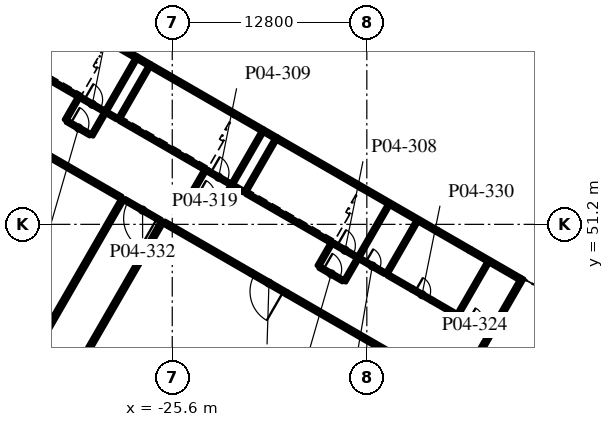
"""IFC4 building model, lengths in metres.
Left out: names, types, materials, properties, quantities, classifications, styles, units other than length and angle.
Written with IfcOpenShell. Run it as: python <this file> out.ifc"""

import sys

from ifc_helpers import new_model, si_unit, direction, frame, frame_2d, origin, place, context, subcontext, project, spatial, rectangle, extrude, element, fill, save


model = new_model("IFC4")
c1 = context("Model", 3, precision=1e-05, world=origin(), true_north=direction((0.0, 1.0)))
c2 = subcontext(c1, "Body", "Model", "MODEL_VIEW")
j1 = project(units=[si_unit("LENGTHUNIT", "METRE"), si_unit("PLANEANGLEUNIT", "RADIAN")], contexts=[c1])
p1 = place(None, origin())
s1 = spatial("IfcSite", under=j1, at=p1, CompositionType="ELEMENT")
p2 = place(p1, origin())
s2 = spatial("IfcBuilding", under=s1, at=p2, CompositionType="ELEMENT")
p3 = place(p2, frame((0.0, 0.0, 21.6)))
s3 = spatial("IfcBuildingStorey", under=s2, at=p3, CompositionType="ELEMENT", Elevation=21.6)
p4 = place(p3, frame((-2.562, 47.667, 0.0), z_axis=(0.0, 0.0, 1.0), x_axis=(-0.499999331568, -0.866025789703, 0.0)))
e1 = element("IfcWall", 1, at=p4, inside=s3, PredefinedType="SOLIDWALL", context=c2, shape_type="SweptSolid", body=[
    extrude(rectangle(XDim=8.625, YDim=0.25, at=frame_2d((4.312, 0.0))), origin(), (0.0, 0.0, 1.0), 4.5),
])
for number, where, z_axis, x_axis in (
    (2, (-26.252, 51.385, 0.0), (0.0, 0.0, 1.0), (-0.5, -0.866, 0.0)),
    (3, (-38.538, 36.106, 0.0), (0.0, 0.0, 1.0), (0.5, 0.866, 0.0)),
):
    element("IfcWall", number, at=place(p3, frame(where, z_axis=z_axis, x_axis=x_axis)), inside=s3, PredefinedType="SOLIDWALL", context=c2, shape_type="SweptSolid", body=[
        extrude(rectangle(XDim=19.375, YDim=0.25, at=frame_2d((9.688, 0.0))), origin(), (0.0, 0.0, 1.0), 4.5),
    ])
p5 = place(p3, frame((-6.024, 49.522, 0.0), z_axis=(0.0, 0.0, 1.0), x_axis=(0.866000483506, -0.500043160704, 0.0)))
e4 = element("IfcWall", 4, at=p5, inside=s3, PredefinedType="SOLIDWALL", context=c2, shape_type="SweptSolid", body=[
    extrude(rectangle(XDim=3.8, YDim=0.25, at=frame_2d((1.9, 0.0))), origin(), (0.0, 0.0, 1.0), 4.5),
])
p6 = place(p3, frame((-8.189, 50.772, 0.0), z_axis=(0.0, 0.0, 1.0), x_axis=(0.866022959057, -0.500004234368, 0.0)))
e5 = element("IfcWall", 5, at=p6, inside=s3, PredefinedType="SOLIDWALL", context=c2, shape_type="SweptSolid", body=[
    extrude(rectangle(XDim=2.5, YDim=0.25, at=frame_2d((1.25, 0.0))), origin(), (0.0, 0.0, 1.0), 4.5),
])
p7 = place(p6, frame((0.25, 0.0, 0.9)))
e6 = element("IfcOpeningElement", 6, at=p7, cuts=e5, PredefinedType="OPENING", context=c2, shape_type="SweptSolid", body=[
    extrude(rectangle(XDim=2.0, YDim=1.8, at=frame_2d((1.0, 0.9))), frame((0.0, 0.135, 0.0), z_axis=(0.0, -1.0, 0.0), x_axis=(1.0, 0.0, 0.0)), (0.0, 0.0, 1.0), 0.27),
])
p8 = place(p3, frame((-18.755, 56.872, 0.0), z_axis=(0.0, 0.0, 1.0), x_axis=(0.866033961403, -0.499985177477, 0.0)))
e7 = element("IfcWall", 7, at=p8, inside=s3, PredefinedType="SOLIDWALL", context=c2, shape_type="SweptSolid", body=[
    extrude(rectangle(XDim=12.2, YDim=0.25, at=frame_2d((6.1, 0.0))), origin(), (0.0, 0.0, 1.0), 4.5),
])
p9 = place(p3, frame((-27.069, 61.672, 0.0), z_axis=(0.0, 0.0, 1.0), x_axis=(0.866021068297, -0.500007509209, 0.0)))
e8 = element("IfcWall", 8, at=p9, inside=s3, PredefinedType="SOLIDWALL", context=c2, shape_type="SweptSolid", body=[
    extrude(rectangle(XDim=8.6, YDim=0.25, at=frame_2d((4.3, 0.0))), origin(), (0.0, 0.0, 1.0), 4.5),
])
p10 = place(p3, frame((-35.383, 66.472, 0.0), z_axis=(0.0, 0.0, 1.0), x_axis=(0.866028165386, -0.499995216735, 0.0)))
e9 = element("IfcWall", 9, at=p10, inside=s3, PredefinedType="SOLIDWALL", context=c2, shape_type="SweptSolid", body=[
    extrude(rectangle(XDim=8.6, YDim=0.25, at=frame_2d((4.3, 0.0))), origin(), (0.0, 0.0, 1.0), 4.5),
])
p11 = place(p3, frame((-18.068, 46.66, 0.0), z_axis=(0.0, 0.0, 1.0), x_axis=(0.866025499775, -0.499999833739, 0.0)))
e10 = element("IfcWall", 10, at=p11, inside=s3, PredefinedType="SOLIDWALL", context=c2, shape_type="SweptSolid", body=[
    extrude(rectangle(XDim=12.8, YDim=0.25, at=frame_2d((6.4, 0.0))), origin(), (0.0, 0.0, 1.0), 4.5),
])
p12 = place(p3, frame((-18.068, 46.66, 0.0), z_axis=(0.0, 0.0, 1.0), x_axis=(-0.866019956843, 0.50000943426, 0.0)))
e11 = element("IfcWall", 11, at=p12, inside=s3, PredefinedType="SOLIDWALL", context=c2, shape_type="SweptSolid", body=[
    extrude(rectangle(XDim=2.7, YDim=0.25, at=frame_2d((1.35, 0.0))), origin(), (0.0, 0.0, 1.0), 4.5),
])
p13 = place(p12, frame((0.25, 0.0, 0.0)))
e12 = element("IfcOpeningElement", 12, at=p13, cuts=e11, PredefinedType="OPENING", context=c2, shape_type="SweptSolid", body=[
    extrude(rectangle(XDim=2.2, YDim=2.1, at=frame_2d((1.1, 1.05))), frame((0.0, 0.135, 0.0), z_axis=(0.0, -1.0, 0.0), x_axis=(1.0, 0.0, 0.0)), (0.0, 0.0, 1.0), 0.27),
])
for number, where, z_axis, x_axis in (
    (13, (-26.144, 51.323, 0.0), (0.0, 0.0, 1.0), (0.866, -0.5, 0.0)),
    (14, (-34.696, 56.26, 0.0), (0.0, 0.0, 1.0), (0.866, -0.5, 0.0)),
):
    element("IfcWall", number, at=place(p3, frame(where, z_axis=z_axis, x_axis=x_axis)), inside=s3, PredefinedType="SOLIDWALL", context=c2, shape_type="SweptSolid", body=[
        extrude(rectangle(XDim=6.625, YDim=0.25, at=frame_2d((3.312, 0.0))), origin(), (0.0, 0.0, 1.0), 4.5),
    ])
for number, where, z_axis, x_axis in (
    (15, (-19.621, 57.372, 0.0), (0.0, 0.0, 1.0), (0.866, -0.5, 0.0)),
    (16, (-27.935, 62.172, 0.0), (0.0, 0.0, 1.0), (0.866, -0.5, 0.0)),
):
    element("IfcWall", number, at=place(p3, frame(where, z_axis=z_axis, x_axis=x_axis)), inside=s3, PredefinedType="SOLIDWALL", context=c2, shape_type="SweptSolid", body=[
        extrude(rectangle(XDim=1.0, YDim=0.25, at=frame_2d((0.5, 0.0))), origin(), (0.0, 0.0, 1.0), 4.5),
    ])
p14 = place(p3, frame((-11.369, 52.463, 0.0), z_axis=(0.0, 0.0, 1.0), x_axis=(-0.50002537861, -0.866010750942, 0.0)))
e17 = element("IfcWall", 17, at=p14, inside=s3, PredefinedType="SOLIDWALL", context=c2, shape_type="SweptSolid", body=[
    extrude(rectangle(XDim=4.0, YDim=0.2, at=frame_2d((2.0, 0.0))), origin(), (0.0, 0.0, 1.0), 4.5),
])
for number, where, z_axis, x_axis in (
    (18, (-18.817, 56.763, 0.0), (0.0, 0.0, 1.0), (-0.5, -0.866, 0.0)),
    (19, (-19.683, 57.263, 0.0), (0.0, 0.0, 1.0), (-0.5, -0.866, 0.0)),
    (20, (-27.131, 61.563, 0.0), (0.0, 0.0, 1.0), (-0.5, -0.866, 0.0)),
    (21, (-27.997, 62.063, 0.0), (0.0, 0.0, 1.0), (-0.5, -0.866, 0.0)),
):
    element("IfcWall", number, at=place(p3, frame(where, z_axis=z_axis, x_axis=x_axis)), inside=s3, PredefinedType="SOLIDWALL", context=c2, shape_type="SweptSolid", body=[
        extrude(rectangle(XDim=4.0, YDim=0.2, at=frame_2d((2.0, 0.0))), origin(), (0.0, 0.0, 1.0), 4.5),
    ])
p15 = place(p3, frame((-14.972, 49.924, 0.0), z_axis=(0.0, 0.0, 1.0), x_axis=(0.866036909293, -0.499980071345, 0.0)))
e22 = element("IfcWall", 22, at=p15, inside=s3, PredefinedType="SOLIDWALL", context=c2, shape_type="SweptSolid", body=[
    extrude(rectangle(XDim=1.75, YDim=0.2, at=frame_2d((0.875, 0.0))), origin(), (0.0, 0.0, 1.0), 4.5),
])
p16 = place(p15, frame((0.25, 0.0, 0.0)))
e23 = element("IfcOpeningElement", 23, at=p16, cuts=e22, PredefinedType="OPENING", context=c2, shape_type="SweptSolid", body=[
    extrude(rectangle(XDim=1.2, YDim=2.1, at=frame_2d((0.6, 1.05))), frame((0.0, 0.11, 0.0), z_axis=(0.0, -1.0, 0.0), x_axis=(1.0, 0.0, 0.0)), (0.0, 0.0, 1.0), 0.22),
])
p17 = place(p3, frame((-14.972, 49.924, 0.0), z_axis=(0.0, 0.0, 1.0), x_axis=(-0.86601134256, 0.500024353964, 0.0)))
e24 = element("IfcWall", 24, at=p17, inside=s3, PredefinedType="SOLIDWALL", context=c2, shape_type="SweptSolid", body=[
    extrude(rectangle(XDim=6.65, YDim=0.2, at=frame_2d((3.325, 0.0))), origin(), (0.0, 0.0, 1.0), 4.5),
])
p18 = place(p3, frame((-23.285, 54.724, 0.0), z_axis=(0.0, 0.0, 1.0), x_axis=(0.866002029911, -0.500040482552, 0.0)))
e25 = element("IfcWall", 25, at=p18, inside=s3, PredefinedType="SOLIDWALL", context=c2, shape_type="SweptSolid", body=[
    extrude(rectangle(XDim=1.75, YDim=0.2, at=frame_2d((0.875, 0.0))), origin(), (0.0, 0.0, 1.0), 4.5),
])
p19 = place(p18, frame((0.25, 0.0, 0.0)))
e26 = element("IfcOpeningElement", 26, at=p19, cuts=e25, PredefinedType="OPENING", context=c2, shape_type="SweptSolid", body=[
    extrude(rectangle(XDim=1.2, YDim=2.1, at=frame_2d((0.6, 1.05))), frame((0.0, 0.11, 0.0), z_axis=(0.0, -1.0, 0.0), x_axis=(1.0, 0.0, 0.0)), (0.0, 0.0, 1.0), 0.22),
])
p20 = place(p3, frame((-23.285, 54.724, 0.0), z_axis=(0.0, 0.0, 1.0), x_axis=(-0.866027239912, 0.49999681972, 0.0)))
e27 = element("IfcWall", 27, at=p20, inside=s3, PredefinedType="SOLIDWALL", context=c2, shape_type="SweptSolid", body=[
    extrude(rectangle(XDim=6.65, YDim=0.2, at=frame_2d((3.325, 0.0))), origin(), (0.0, 0.0, 1.0), 4.5),
])
p21 = place(p3, frame((-31.599, 59.524, 0.0), z_axis=(0.0, 0.0, 1.0), x_axis=(0.866036909293, -0.499980071345, 0.0)))
e28 = element("IfcWall", 28, at=p21, inside=s3, PredefinedType="SOLIDWALL", context=c2, shape_type="SweptSolid", body=[
    extrude(rectangle(XDim=1.75, YDim=0.2, at=frame_2d((0.875, 0.0))), origin(), (0.0, 0.0, 1.0), 4.5),
])
p22 = place(p21, frame((0.25, 0.0, 0.0)))
e29 = element("IfcOpeningElement", 29, at=p22, cuts=e28, PredefinedType="OPENING", context=c2, shape_type="SweptSolid", body=[
    extrude(rectangle(XDim=1.2, YDim=2.1, at=frame_2d((0.6, 1.05))), frame((0.0, 0.11, 0.0), z_axis=(0.0, -1.0, 0.0), x_axis=(1.0, 0.0, 0.0)), (0.0, 0.0, 1.0), 0.22),
])
p23 = place(p3, frame((-31.599, 59.524, 0.0), z_axis=(0.0, 0.0, 1.0), x_axis=(-0.866027239912, 0.49999681972, 0.0)))
e30 = element("IfcWall", 30, at=p23, inside=s3, PredefinedType="SOLIDWALL", context=c2, shape_type="SweptSolid", body=[
    extrude(rectangle(XDim=6.65, YDim=0.2, at=frame_2d((3.325, 0.0))), origin(), (0.0, 0.0, 1.0), 4.5),
])
p24 = place(p3, frame((-13.419, 48.913, 0.0), z_axis=(0.0, 0.0, 1.0), x_axis=(-0.500000056704, -0.866025371046, 0.0)))
e31 = element("IfcWall", 31, at=p24, inside=s3, PredefinedType="PARTITIONING", context=c2, shape_type="SweptSolid", body=[
    extrude(rectangle(XDim=1.7, YDim=0.2, at=frame_2d((0.85, 0.0))), origin(), (0.0, 0.0, 1.0), 4.5),
])
for number, where, z_axis, x_axis in (
    (32, (-15.152, 49.913, 0.0), (0.0, 0.0, 1.0), (-0.5, -0.866, 0.0)),
    (33, (-21.733, 53.713, 0.0), (0.0, 0.0, 1.0), (-0.5, -0.866, 0.0)),
):
    element("IfcWall", number, at=place(p3, frame(where, z_axis=z_axis, x_axis=x_axis)), inside=s3, PredefinedType="PARTITIONING", context=c2, shape_type="SweptSolid", body=[
        extrude(rectangle(XDim=1.7, YDim=0.2, at=frame_2d((0.85, 0.0))), origin(), (0.0, 0.0, 1.0), 4.5),
    ])
p25 = place(p3, frame((-23.465, 54.713, 0.0), z_axis=(0.0, 0.0, 1.0), x_axis=(-0.500000056704, -0.866025371046, 0.0)))
e34 = element("IfcWall", 34, at=p25, inside=s3, PredefinedType="PARTITIONING", context=c2, shape_type="SweptSolid", body=[
    extrude(rectangle(XDim=1.7, YDim=0.2, at=frame_2d((0.85, 0.0))), origin(), (0.0, 0.0, 1.0), 4.5),
])
for number, where, z_axis, x_axis in (
    (35, (-30.047, 58.513, 0.0), (0.0, 0.0, 1.0), (-0.5, -0.866, 0.0)),
    (36, (-31.779, 59.513, 0.0), (0.0, 0.0, 1.0), (-0.5, -0.866, 0.0)),
):
    element("IfcWall", number, at=place(p3, frame(where, z_axis=z_axis, x_axis=x_axis)), inside=s3, PredefinedType="PARTITIONING", context=c2, shape_type="SweptSolid", body=[
        extrude(rectangle(XDim=1.7, YDim=0.2, at=frame_2d((0.85, 0.0))), origin(), (0.0, 0.0, 1.0), 4.5),
    ])
p26 = place(p3, frame((-15.915, 48.39, 0.0), z_axis=(0.0, 0.0, 1.0), x_axis=(0.866013897511, -0.50001992892, 0.0)))
e37 = element("IfcWall", 37, at=p26, inside=s3, PredefinedType="PARTITIONING", context=c2, shape_type="SweptSolid", body=[
    extrude(rectangle(XDim=1.8, YDim=0.2, at=frame_2d((0.9, 0.0))), origin(), (0.0, 0.0, 1.0), 4.5),
])
p27 = place(p26, frame((0.3, 0.0, 0.0)))
e38 = element("IfcOpeningElement", 38, at=p27, cuts=e37, PredefinedType="OPENING", context=c2, shape_type="SweptSolid", body=[
    extrude(rectangle(XDim=1.2, YDim=2.1, at=frame_2d((0.6, 1.05))), frame((0.0, 0.11, 0.0), z_axis=(0.0, -1.0, 0.0), x_axis=(1.0, 0.0, 0.0)), (0.0, 0.0, 1.0), 0.22),
])
p28 = place(p3, frame((-24.229, 53.19, 0.0), z_axis=(0.0, 0.0, 1.0), x_axis=(0.866047807691, -0.499961193289, 0.0)))
e39 = element("IfcWall", 39, at=p28, inside=s3, PredefinedType="PARTITIONING", context=c2, shape_type="SweptSolid", body=[
    extrude(rectangle(XDim=1.8, YDim=0.2, at=frame_2d((0.9, 0.0))), origin(), (0.0, 0.0, 1.0), 4.5),
])
p29 = place(p28, frame((0.3, 0.0, 0.0)))
e40 = element("IfcOpeningElement", 40, at=p29, cuts=e39, PredefinedType="OPENING", context=c2, shape_type="SweptSolid", body=[
    extrude(rectangle(XDim=1.2, YDim=2.1, at=frame_2d((0.6, 1.05))), frame((0.0, 0.11, 0.0), z_axis=(0.0, -1.0, 0.0), x_axis=(1.0, 0.0, 0.0)), (0.0, 0.0, 1.0), 0.22),
])
p30 = place(p3, frame((-32.542, 57.99, 0.0), z_axis=(0.0, 0.0, 1.0), x_axis=(0.866047807691, -0.499961193289, 0.0)))
e41 = element("IfcWall", 41, at=p30, inside=s3, PredefinedType="PARTITIONING", context=c2, shape_type="SweptSolid", body=[
    extrude(rectangle(XDim=1.8, YDim=0.2, at=frame_2d((0.9, 0.0))), origin(), (0.0, 0.0, 1.0), 4.5),
])
p31 = place(p30, frame((0.3, 0.0, 0.0)))
e42 = element("IfcOpeningElement", 42, at=p31, cuts=e41, PredefinedType="OPENING", context=c2, shape_type="SweptSolid", body=[
    extrude(rectangle(XDim=1.2, YDim=2.1, at=frame_2d((0.6, 1.05))), frame((0.0, 0.11, 0.0), z_axis=(0.0, -1.0, 0.0), x_axis=(1.0, 0.0, 0.0)), (0.0, 0.0, 1.0), 0.22),
])
p32 = place(p3, frame((-4.831, 48.688, 0.0), z_axis=(0.0, 0.0, 1.0), x_axis=(-0.49999894854, -0.866026010844, 0.0)))
e43 = element("IfcWall", 43, at=p32, inside=s3, PredefinedType="PARTITIONING", context=c2, shape_type="SweptSolid", body=[
    extrude(rectangle(XDim=4.0, YDim=0.2, at=frame_2d((2.0, 0.0))), origin(), (0.0, 0.0, 1.0), 4.5),
])
p33 = place(p3, frame((-6.744, 45.174, 0.0), z_axis=(0.0, 0.0, 1.0), x_axis=(0.866017533419, -0.500013631625, 0.0)))
e44 = element("IfcWall", 44, at=p33, inside=s3, PredefinedType="PARTITIONING", context=c2, shape_type="SweptSolid", body=[
    extrude(rectangle(XDim=2.25, YDim=0.2, at=frame_2d((1.125, 0.0))), origin(), (0.0, 0.0, 1.0), 4.5),
])
p34 = place(p33, frame((0.7, 0.0, 0.0)))
e45 = element("IfcOpeningElement", 45, at=p34, cuts=e44, PredefinedType="OPENING", context=c2, shape_type="SweptSolid", body=[
    extrude(rectangle(XDim=1.0, YDim=2.1, at=frame_2d((0.5, 1.05))), frame((0.0, 0.11, 0.0), z_axis=(0.0, -1.0, 0.0), x_axis=(1.0, 0.0, 0.0)), (0.0, 0.0, 1.0), 0.22),
])
p35 = place(p3, frame((-9.508, 51.388, 0.0), z_axis=(0.0, 0.0, 1.0), x_axis=(-0.49999894854, -0.866026010844, 0.0)))
e46 = element("IfcWall", 46, at=p35, inside=s3, PredefinedType="PARTITIONING", context=c2, shape_type="SweptSolid", body=[
    extrude(rectangle(XDim=4.0, YDim=0.2, at=frame_2d((2.0, 0.0))), origin(), (0.0, 0.0, 1.0), 4.5),
])
p36 = place(p3, frame((-6.917, 45.274, 0.0), z_axis=(0.0, 0.0, 1.0), x_axis=(-0.866033964044, 0.499985172903, 0.0)))
e47 = element("IfcWall", 47, at=p36, inside=s3, PredefinedType="PARTITIONING", context=c2, shape_type="SweptSolid", body=[
    extrude(rectangle(XDim=1.85, YDim=0.2, at=frame_2d((0.925, 0.0))), origin(), (0.0, 0.0, 1.0), 4.5),
])
p37 = place(p3, frame((-9.819, 46.949, 0.0), z_axis=(0.0, 0.0, 1.0), x_axis=(0.866031096941, -0.499990139034, 0.0)))
e48 = element("IfcWall", 48, at=p37, inside=s3, PredefinedType="PARTITIONING", context=c2, shape_type="SweptSolid", body=[
    extrude(rectangle(XDim=1.5, YDim=0.2, at=frame_2d((0.75, 0.0))), origin(), (0.0, 0.0, 1.0), 4.5),
])
p38 = place(p37, frame((0.25, 0.0, 0.0)))
e49 = element("IfcOpeningElement", 49, at=p38, cuts=e48, PredefinedType="OPENING", context=c2, shape_type="SweptSolid", body=[
    extrude(rectangle(XDim=1.0, YDim=2.1, at=frame_2d((0.5, 1.05))), frame((0.0, 0.11, 0.0), z_axis=(0.0, -1.0, 0.0), x_axis=(1.0, 0.0, 0.0)), (0.0, 0.0, 1.0), 0.22),
])
p39 = place(p3, frame((-9.819, 46.949, 0.0), z_axis=(0.0, 0.0, 1.0), x_axis=(-0.866000971088, 0.500042316284, 0.0)))
e50 = element("IfcWall", 50, at=p39, inside=s3, PredefinedType="PARTITIONING", context=c2, shape_type="SweptSolid", body=[
    extrude(rectangle(XDim=1.85, YDim=0.2, at=frame_2d((0.925, 0.0))), origin(), (0.0, 0.0, 1.0), 4.5),
])
p40 = place(p3, frame((-13.283, 48.949, 0.0), z_axis=(0.0, 0.0, 1.0), x_axis=(0.866031321059, -0.49998975084, 0.0)))
e51 = element("IfcWall", 51, at=p40, inside=s3, PredefinedType="PARTITIONING", context=c2, shape_type="SweptSolid", body=[
    extrude(rectangle(XDim=1.95, YDim=0.2, at=frame_2d((0.975, 0.0))), origin(), (0.0, 0.0, 1.0), 4.5),
])
p41 = place(p40, frame((0.475, 0.0, 0.0)))
e52 = element("IfcOpeningElement", 52, at=p41, cuts=e51, PredefinedType="OPENING", context=c2, shape_type="SweptSolid", body=[
    extrude(rectangle(XDim=1.0, YDim=2.1, at=frame_2d((0.5, 1.05))), frame((0.0, 0.11, 0.0), z_axis=(0.0, -1.0, 0.0), x_axis=(1.0, 0.0, 0.0)), (0.0, 0.0, 1.0), 0.22),
])
p42 = place(p3, frame((-26.361, 51.448, 0.0), z_axis=(0.0, 0.0, 1.0), x_axis=(-0.866027397988, 0.499996545922, 0.0)))
e53 = element("IfcWall", 53, at=p42, inside=s3, PredefinedType="PARTITIONING", context=c2, shape_type="SweptSolid", body=[
    extrude(rectangle(XDim=2.75, YDim=0.2, at=frame_2d((1.375, 0.0))), origin(), (0.0, 0.0, 1.0), 4.5),
])
p43 = place(p42, frame((0.275, 0.0, 0.0)))
e54 = element("IfcOpeningElement", 54, at=p43, cuts=e53, PredefinedType="OPENING", context=c2, shape_type="SweptSolid", body=[
    extrude(rectangle(XDim=2.2, YDim=2.1, at=frame_2d((1.1, 1.05))), frame((0.0, 0.11, 0.0), z_axis=(0.0, -1.0, 0.0), x_axis=(1.0, 0.0, 0.0)), (0.0, 0.0, 1.0), 0.22),
])
p44 = place(p3, frame((-20.904, 53.349, 0.0), z_axis=(0.0, 0.0, 1.0), x_axis=(-0.865961984968, 0.500109828528, 0.0)))
e55 = element("IfcWall", 55, at=p44, inside=s3, PredefinedType="PARTITIONING", context=c2, shape_type="SweptSolid", body=[
    extrude(rectangle(XDim=0.8, YDim=0.2, at=frame_2d((0.4, 0.0))), origin(), (0.0, 0.0, 1.0), 4.5),
])
p45 = place(p3, frame((-29.218, 58.149, 0.0), z_axis=(0.0, 0.0, 1.0), x_axis=(-0.866017831539, 0.500013115284, 0.0)))
e56 = element("IfcWall", 56, at=p45, inside=s3, PredefinedType="PARTITIONING", context=c2, shape_type="SweptSolid", body=[
    extrude(rectangle(XDim=0.8, YDim=0.2, at=frame_2d((0.4, 0.0))), origin(), (0.0, 0.0, 1.0), 4.5),
])
p46 = place(p7, origin())
e57 = element("IfcWindow", 57, at=p46, inside=s3, PartitioningType="SINGLE_PANEL", PredefinedType="WINDOW", context=c2, shape_type="SweptSolid", body=[
    extrude(rectangle(XDim=2.0, YDim=1.8, at=frame_2d((1.0, 0.9))), frame((0.0, 0.03, 0.0), z_axis=(0.0, -1.0, 0.0), x_axis=(1.0, 0.0, 0.0)), (0.0, 0.0, 1.0), 0.06),
])
fill(e6, e57)
p47 = place(p13, origin())
e58 = element("IfcDoor", 58, at=p47, inside=s3, OperationType="DOUBLE_DOOR_SINGLE_SWING", PredefinedType="DOOR", context=c2, shape_type="SweptSolid", body=[
    extrude(rectangle(XDim=2.2, YDim=2.1, at=frame_2d((1.1, 1.05))), frame((0.0, 0.025, 0.0), z_axis=(0.0, -1.0, 0.0), x_axis=(1.0, 0.0, 0.0)), (0.0, 0.0, 1.0), 0.05),
])
fill(e12, e58)
p48 = place(p16, origin())
e59 = element("IfcDoor", 59, at=p48, inside=s3, OperationType="SINGLE_SWING_LEFT", PredefinedType="DOOR", context=c2, shape_type="SweptSolid", body=[
    extrude(rectangle(XDim=1.2, YDim=2.1, at=frame_2d((0.6, 1.05))), frame((0.0, 0.025, 0.0), z_axis=(0.0, -1.0, 0.0), x_axis=(1.0, 0.0, 0.0)), (0.0, 0.0, 1.0), 0.05),
])
fill(e23, e59)
p49 = place(p19, origin())
e60 = element("IfcDoor", 60, at=p49, inside=s3, OperationType="SINGLE_SWING_LEFT", PredefinedType="DOOR", context=c2, shape_type="SweptSolid", body=[
    extrude(rectangle(XDim=1.2, YDim=2.1, at=frame_2d((0.6, 1.05))), frame((0.0, 0.025, 0.0), z_axis=(0.0, -1.0, 0.0), x_axis=(1.0, 0.0, 0.0)), (0.0, 0.0, 1.0), 0.05),
])
fill(e26, e60)
p50 = place(p22, origin())
e61 = element("IfcDoor", 61, at=p50, inside=s3, OperationType="SINGLE_SWING_LEFT", PredefinedType="DOOR", context=c2, shape_type="SweptSolid", body=[
    extrude(rectangle(XDim=1.2, YDim=2.1, at=frame_2d((0.6, 1.05))), frame((0.0, 0.025, 0.0), z_axis=(0.0, -1.0, 0.0), x_axis=(1.0, 0.0, 0.0)), (0.0, 0.0, 1.0), 0.05),
])
fill(e29, e61)
p51 = place(p27, origin())
e62 = element("IfcDoor", 62, at=p51, inside=s3, OperationType="SINGLE_SWING_LEFT", PredefinedType="DOOR", context=c2, shape_type="SweptSolid", body=[
    extrude(rectangle(XDim=1.2, YDim=2.1, at=frame_2d((0.6, 1.05))), frame((0.0, 0.025, 0.0), z_axis=(0.0, -1.0, 0.0), x_axis=(1.0, 0.0, 0.0)), (0.0, 0.0, 1.0), 0.05),
])
fill(e38, e62)
p52 = place(p29, origin())
e63 = element("IfcDoor", 63, at=p52, inside=s3, OperationType="SINGLE_SWING_LEFT", PredefinedType="DOOR", context=c2, shape_type="SweptSolid", body=[
    extrude(rectangle(XDim=1.2, YDim=2.1, at=frame_2d((0.6, 1.05))), frame((0.0, 0.025, 0.0), z_axis=(0.0, -1.0, 0.0), x_axis=(1.0, 0.0, 0.0)), (0.0, 0.0, 1.0), 0.05),
])
fill(e40, e63)
p53 = place(p31, origin())
e64 = element("IfcDoor", 64, at=p53, inside=s3, OperationType="SINGLE_SWING_LEFT", PredefinedType="DOOR", context=c2, shape_type="SweptSolid", body=[
    extrude(rectangle(XDim=1.2, YDim=2.1, at=frame_2d((0.6, 1.05))), frame((0.0, 0.025, 0.0), z_axis=(0.0, -1.0, 0.0), x_axis=(1.0, 0.0, 0.0)), (0.0, 0.0, 1.0), 0.05),
])
fill(e42, e64)
p54 = place(p34, origin())
e65 = element("IfcDoor", 65, at=p54, inside=s3, OperationType="SINGLE_SWING_LEFT", PredefinedType="DOOR", context=c2, shape_type="SweptSolid", body=[
    extrude(rectangle(XDim=1.0, YDim=2.1, at=frame_2d((0.5, 1.05))), frame((0.0, 0.025, 0.0), z_axis=(0.0, -1.0, 0.0), x_axis=(1.0, 0.0, 0.0)), (0.0, 0.0, 1.0), 0.05),
])
fill(e45, e65)
p55 = place(p38, origin())
e66 = element("IfcDoor", 66, at=p55, inside=s3, OperationType="SINGLE_SWING_LEFT", PredefinedType="DOOR", context=c2, shape_type="SweptSolid", body=[
    extrude(rectangle(XDim=1.0, YDim=2.1, at=frame_2d((0.5, 1.05))), frame((0.0, 0.025, 0.0), z_axis=(0.0, -1.0, 0.0), x_axis=(1.0, 0.0, 0.0)), (0.0, 0.0, 1.0), 0.05),
])
fill(e49, e66)
p56 = place(p41, origin())
e67 = element("IfcDoor", 67, at=p56, inside=s3, OperationType="SINGLE_SWING_LEFT", PredefinedType="DOOR", context=c2, shape_type="SweptSolid", body=[
    extrude(rectangle(XDim=1.0, YDim=2.1, at=frame_2d((0.5, 1.05))), frame((0.0, 0.025, 0.0), z_axis=(0.0, -1.0, 0.0), x_axis=(1.0, 0.0, 0.0)), (0.0, 0.0, 1.0), 0.05),
])
fill(e52, e67)
p57 = place(p43, origin())
e68 = element("IfcDoor", 68, at=p57, inside=s3, OperationType="DOUBLE_DOOR_SINGLE_SWING", PredefinedType="DOOR", context=c2, shape_type="SweptSolid", body=[
    extrude(rectangle(XDim=2.2, YDim=2.1, at=frame_2d((1.1, 1.05))), frame((0.0, 0.025, 0.0), z_axis=(0.0, -1.0, 0.0), x_axis=(1.0, 0.0, 0.0)), (0.0, 0.0, 1.0), 0.05),
])
fill(e54, e68)
save(model, sys.argv[1])
